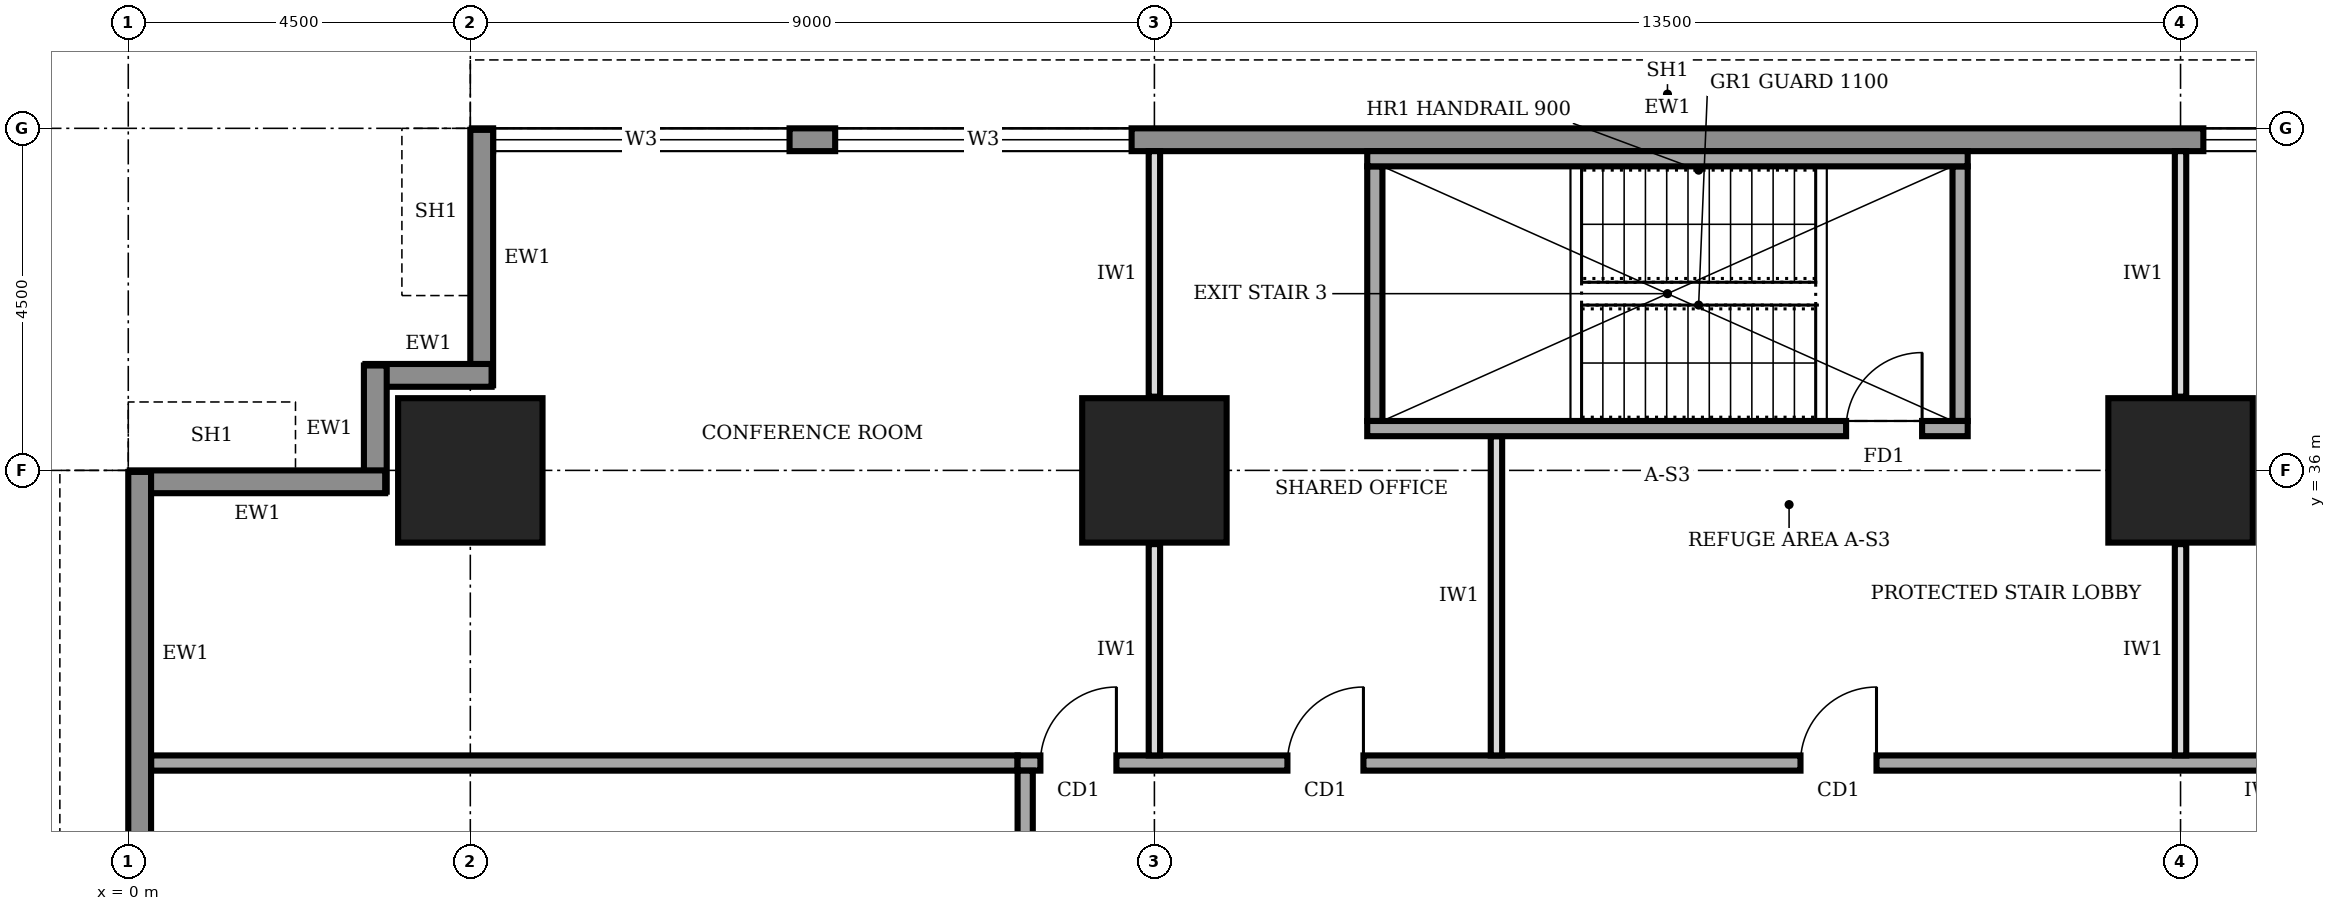
"""IFC4 building model, lengths in metres.
Left out: names, types, materials, properties, quantities, classifications, styles, units other than length and angle.
Written with IfcOpenShell. Run it as: python <this file> out.ifc"""

import sys

from ifc_helpers import new_model, si_unit, direction, frame, frame_2d, origin, origin_2d, place, context, subcontext, project, spatial, rectangle, extrude, element, fill, save


model = new_model("IFC4")
c1 = context("Model", 3, precision=1e-05, world=origin(), true_north=direction((0.0, 1.0)))
c2 = subcontext(c1, "Body", "Model", "MODEL_VIEW")
j1 = project(units=[si_unit("LENGTHUNIT", "METRE"), si_unit("PLANEANGLEUNIT", "RADIAN")], contexts=[c1])
p1 = place(None, origin())
s1 = spatial("IfcSite", under=j1, at=p1, CompositionType="ELEMENT")
p2 = place(p1, origin())
s2 = spatial("IfcBuilding", under=s1, at=p2, CompositionType="ELEMENT")
p3 = place(p2, frame((0.0, 0.0, 97.0)))
s3 = spatial("IfcBuildingStorey", under=s2, at=p3, CompositionType="ELEMENT", Elevation=97.0)
for number, where, z_axis, x_axis in (
    (1, (4.5, 36.0, 0.0), (0.0, 0.0, 1.0), (1.0, 0.0, 0.0)),
    (2, (13.5, 36.0, 0.0), (0.0, 0.0, 1.0), (1.0, 0.0, 0.0)),
    (3, (27.0, 36.0, 0.0), (0.0, 0.0, 1.0), (1.0, 0.0, 0.0)),
):
    element("IfcColumn", number, at=place(p3, frame(where, z_axis=z_axis, x_axis=x_axis)), inside=s3, PredefinedType="COLUMN", context=c2, shape_type="SweptSolid", body=[
        extrude(rectangle(XDim=1.9, YDim=1.9, at=origin_2d()), origin(), (0.0, 0.0, 1.0), 4.0),
    ])
p4 = place(p3, frame((35.98, 40.35, 0.0), z_axis=(0.0, 0.0, 1.0), x_axis=(-1.0, 0.0, 0.0)))
e4 = element("IfcWall", 4, at=p4, inside=s3, PredefinedType="STANDARD", context=c2, shape_type="SweptSolid", body=[
    extrude(rectangle(XDim=31.46, YDim=0.3, at=frame_2d((15.73, 0.0))), origin(), (0.0, 0.0, 1.0), 3.75),
])
p5 = place(p4, frame((27.28, 0.0, 0.95)))
e5 = element("IfcOpeningElement", 5, at=p5, cuts=e4, PredefinedType="OPENING", context=c2, shape_type="SweptSolid", body=[
    extrude(rectangle(XDim=3.9, YDim=1.8, at=frame_2d((1.95, 0.9))), frame((0.0, 0.16, 0.0), z_axis=(0.0, -1.0, 0.0), x_axis=(1.0, 0.0, 0.0)), (0.0, 0.0, 1.0), 0.32),
])
p6 = place(p4, frame((22.78, 0.0, 0.95)))
e6 = element("IfcOpeningElement", 6, at=p6, cuts=e4, PredefinedType="OPENING", context=c2, shape_type="SweptSolid", body=[
    extrude(rectangle(XDim=3.9, YDim=1.8, at=frame_2d((1.95, 0.9))), frame((0.0, 0.16, 0.0), z_axis=(0.0, -1.0, 0.0), x_axis=(1.0, 0.0, 0.0)), (0.0, 0.0, 1.0), 0.32),
])
p7 = place(p4, frame((4.78, 0.0, 0.95)))
e7 = element("IfcOpeningElement", 7, at=p7, cuts=e4, PredefinedType="OPENING", context=c2, shape_type="SweptSolid", body=[
    extrude(rectangle(XDim=3.9, YDim=1.8, at=frame_2d((1.95, 0.9))), frame((0.0, 0.16, 0.0), z_axis=(0.0, -1.0, 0.0), x_axis=(1.0, 0.0, 0.0)), (0.0, 0.0, 1.0), 0.32),
])
p8 = place(p3, frame((4.65, 40.48, 0.0), z_axis=(0.0, 0.0, 1.0), x_axis=(0.0, -1.0, 0.0)))
e8 = element("IfcWall", 8, at=p8, inside=s3, PredefinedType="STANDARD", context=c2, shape_type="SweptSolid", body=[
    extrude(rectangle(XDim=3.36, YDim=0.3, at=frame_2d((1.68, 0.0))), origin(), (0.0, 0.0, 1.0), 2.85),
])
for number, where, z_axis, x_axis in (
    (9, (4.78, 37.25, 0.0), (0.0, 0.0, 1.0), (-1.0, 0.0, 0.0)),
    (10, (3.25, 37.38, 0.0), (0.0, 0.0, 1.0), (0.0, -1.0, 0.0)),
):
    element("IfcWall", number, at=place(p3, frame(where, z_axis=z_axis, x_axis=x_axis)), inside=s3, PredefinedType="STANDARD", context=c2, shape_type="SweptSolid", body=[
        extrude(rectangle(XDim=1.66, YDim=0.3, at=frame_2d((0.83, 0.0))), origin(), (0.0, 0.0, 1.0), 3.75),
    ])
p9 = place(p3, frame((3.38, 35.85, 0.0), z_axis=(0.0, 0.0, 1.0), x_axis=(-1.0, 0.0, 0.0)))
e11 = element("IfcWall", 11, at=p9, inside=s3, PredefinedType="STANDARD", context=c2, shape_type="SweptSolid", body=[
    extrude(rectangle(XDim=3.36, YDim=0.3, at=frame_2d((1.68, 0.0))), origin(), (0.0, 0.0, 1.0), 2.85),
])
p10 = place(p3, frame((0.15, 35.98, 0.0), z_axis=(0.0, 0.0, 1.0), x_axis=(0.0, -1.0, 0.0)))
e12 = element("IfcWall", 12, at=p10, inside=s3, PredefinedType="STANDARD", context=c2, shape_type="SweptSolid", body=[
    extrude(rectangle(XDim=31.46, YDim=0.3, at=frame_2d((15.73, 0.0))), origin(), (0.0, 0.0, 1.0), 3.75),
])
p11 = place(p10, frame((27.28, 0.0, 0.95)))
e13 = element("IfcOpeningElement", 13, at=p11, cuts=e12, PredefinedType="OPENING", context=c2, shape_type="SweptSolid", body=[
    extrude(rectangle(XDim=3.9, YDim=1.8, at=frame_2d((1.95, 0.9))), frame((0.0, 0.16, 0.0), z_axis=(0.0, -1.0, 0.0), x_axis=(1.0, 0.0, 0.0)), (0.0, 0.0, 1.0), 0.32),
])
p12 = place(p10, frame((22.78, 0.0, 0.95)))
e14 = element("IfcOpeningElement", 14, at=p12, cuts=e12, PredefinedType="OPENING", context=c2, shape_type="SweptSolid", body=[
    extrude(rectangle(XDim=3.9, YDim=1.8, at=frame_2d((1.95, 0.9))), frame((0.0, 0.16, 0.0), z_axis=(0.0, -1.0, 0.0), x_axis=(1.0, 0.0, 0.0)), (0.0, 0.0, 1.0), 0.32),
])
p13 = place(p10, frame((18.28, 0.0, 0.95)))
e15 = element("IfcOpeningElement", 15, at=p13, cuts=e12, PredefinedType="OPENING", context=c2, shape_type="SweptSolid", body=[
    extrude(rectangle(XDim=3.9, YDim=1.8, at=frame_2d((1.95, 0.9))), frame((0.0, 0.16, 0.0), z_axis=(0.0, -1.0, 0.0), x_axis=(1.0, 0.0, 0.0)), (0.0, 0.0, 1.0), 0.32),
])
p14 = place(p10, frame((13.78, 0.0, 0.95)))
e16 = element("IfcOpeningElement", 16, at=p14, cuts=e12, PredefinedType="OPENING", context=c2, shape_type="SweptSolid", body=[
    extrude(rectangle(XDim=3.9, YDim=1.8, at=frame_2d((1.95, 0.9))), frame((0.0, 0.16, 0.0), z_axis=(0.0, -1.0, 0.0), x_axis=(1.0, 0.0, 0.0)), (0.0, 0.0, 1.0), 0.32),
])
p15 = place(p10, frame((9.28, 0.0, 0.95)))
e17 = element("IfcOpeningElement", 17, at=p15, cuts=e12, PredefinedType="OPENING", context=c2, shape_type="SweptSolid", body=[
    extrude(rectangle(XDim=3.9, YDim=1.8, at=frame_2d((1.95, 0.9))), frame((0.0, 0.16, 0.0), z_axis=(0.0, -1.0, 0.0), x_axis=(1.0, 0.0, 0.0)), (0.0, 0.0, 1.0), 0.32),
])
p16 = place(p10, frame((4.78, 0.0, 0.95)))
e18 = element("IfcOpeningElement", 18, at=p16, cuts=e12, PredefinedType="OPENING", context=c2, shape_type="SweptSolid", body=[
    extrude(rectangle(XDim=3.9, YDim=1.8, at=frame_2d((1.95, 0.9))), frame((0.0, 0.16, 0.0), z_axis=(0.0, -1.0, 0.0), x_axis=(1.0, 0.0, 0.0)), (0.0, 0.0, 1.0), 0.32),
])
p17 = place(p3, frame((40.2, 32.15, 0.0), z_axis=(0.0, 0.0, 1.0), x_axis=(-1.0, 0.0, 0.0)))
e19 = element("IfcWall", 19, at=p17, inside=s3, PredefinedType="SOLIDWALL", context=c2, shape_type="SweptSolid", body=[
    extrude(rectangle(XDim=28.5, YDim=0.2, at=frame_2d((14.25, 0.0))), origin(), (0.0, 0.0, 1.0), 3.75),
])
p18 = place(p17, frame((27.2, 0.0, 0.0)))
e20 = element("IfcOpeningElement", 20, at=p18, cuts=e19, PredefinedType="OPENING", context=c2, shape_type="SweptSolid", body=[
    extrude(rectangle(XDim=1.0, YDim=2.1, at=frame_2d((0.5, 1.05))), frame((0.0, 0.11, 0.0), z_axis=(0.0, -1.0, 0.0), x_axis=(1.0, 0.0, 0.0)), (0.0, 0.0, 1.0), 0.22),
])
p19 = place(p17, frame((23.95, 0.0, 0.0)))
e21 = element("IfcOpeningElement", 21, at=p19, cuts=e19, PredefinedType="OPENING", context=c2, shape_type="SweptSolid", body=[
    extrude(rectangle(XDim=1.0, YDim=2.1, at=frame_2d((0.5, 1.05))), frame((0.0, 0.11, 0.0), z_axis=(0.0, -1.0, 0.0), x_axis=(1.0, 0.0, 0.0)), (0.0, 0.0, 1.0), 0.22),
])
p20 = place(p17, frame((17.2, 0.0, 0.0)))
e22 = element("IfcOpeningElement", 22, at=p20, cuts=e19, PredefinedType="OPENING", context=c2, shape_type="SweptSolid", body=[
    extrude(rectangle(XDim=1.0, YDim=2.1, at=frame_2d((0.5, 1.05))), frame((0.0, 0.11, 0.0), z_axis=(0.0, -1.0, 0.0), x_axis=(1.0, 0.0, 0.0)), (0.0, 0.0, 1.0), 0.22),
])
p21 = place(p17, frame((6.0, 0.0, 0.0)))
e23 = element("IfcOpeningElement", 23, at=p21, cuts=e19, PredefinedType="OPENING", context=c2, shape_type="SweptSolid", body=[
    extrude(rectangle(XDim=1.0, YDim=2.1, at=frame_2d((0.5, 1.05))), frame((0.0, 0.11, 0.0), z_axis=(0.0, -1.0, 0.0), x_axis=(1.0, 0.0, 0.0)), (0.0, 0.0, 1.0), 0.22),
])
p22 = place(p3, frame((11.8, 32.05, 0.0), z_axis=(0.0, 0.0, 1.0), x_axis=(0.0, -1.0, 0.0)))
e24 = element("IfcWall", 24, at=p22, inside=s3, PredefinedType="SOLIDWALL", context=c2, shape_type="SweptSolid", body=[
    extrude(rectangle(XDim=23.8, YDim=0.2, at=frame_2d((11.9, 0.0))), origin(), (0.0, 0.0, 1.0), 3.75),
])
p23 = place(p22, frame((20.675, 0.0, 0.0)))
e25 = element("IfcOpeningElement", 25, at=p23, cuts=e24, PredefinedType="OPENING", context=c2, shape_type="SweptSolid", body=[
    extrude(rectangle(XDim=1.0, YDim=2.1, at=frame_2d((0.5, 1.05))), frame((0.0, 0.11, 0.0), z_axis=(0.0, -1.0, 0.0), x_axis=(1.0, 0.0, 0.0)), (0.0, 0.0, 1.0), 0.22),
])
p24 = place(p22, frame((16.95, 0.0, 0.0)))
e26 = element("IfcOpeningElement", 26, at=p24, cuts=e24, PredefinedType="OPENING", context=c2, shape_type="SweptSolid", body=[
    extrude(rectangle(XDim=1.0, YDim=2.1, at=frame_2d((0.5, 1.05))), frame((0.0, 0.11, 0.0), z_axis=(0.0, -1.0, 0.0), x_axis=(1.0, 0.0, 0.0)), (0.0, 0.0, 1.0), 0.22),
])
p25 = place(p22, frame((13.95, 0.0, 0.0)))
e27 = element("IfcOpeningElement", 27, at=p25, cuts=e24, PredefinedType="OPENING", context=c2, shape_type="SweptSolid", body=[
    extrude(rectangle(XDim=0.9, YDim=2.1, at=frame_2d((0.45, 1.05))), frame((0.0, 0.11, 0.0), z_axis=(0.0, -1.0, 0.0), x_axis=(1.0, 0.0, 0.0)), (0.0, 0.0, 1.0), 0.22),
])
p26 = place(p22, frame((10.9, 0.0, 0.0)))
e28 = element("IfcOpeningElement", 28, at=p26, cuts=e24, PredefinedType="OPENING", context=c2, shape_type="SweptSolid", body=[
    extrude(rectangle(XDim=0.9, YDim=2.1, at=frame_2d((0.45, 1.05))), frame((0.0, 0.11, 0.0), z_axis=(0.0, -1.0, 0.0), x_axis=(1.0, 0.0, 0.0)), (0.0, 0.0, 1.0), 0.22),
])
p27 = place(p22, frame((6.2, 0.0, 0.0)))
e29 = element("IfcOpeningElement", 29, at=p27, cuts=e24, PredefinedType="OPENING", context=c2, shape_type="SweptSolid", body=[
    extrude(rectangle(XDim=0.9, YDim=2.1, at=frame_2d((0.45, 1.05))), frame((0.0, 0.11, 0.0), z_axis=(0.0, -1.0, 0.0), x_axis=(1.0, 0.0, 0.0)), (0.0, 0.0, 1.0), 0.22),
])
p28 = place(p22, frame((8.75, 0.0, 0.0)))
e30 = element("IfcOpeningElement", 30, at=p28, cuts=e24, PredefinedType="OPENING", context=c2, shape_type="SweptSolid", body=[
    extrude(rectangle(XDim=1.0, YDim=2.1, at=frame_2d((0.5, 1.05))), frame((0.0, 0.11, 0.0), z_axis=(0.0, -1.0, 0.0), x_axis=(1.0, 0.0, 0.0)), (0.0, 0.0, 1.0), 0.22),
])
p29 = place(p22, frame((1.925, 0.0, 0.0)))
e31 = element("IfcOpeningElement", 31, at=p29, cuts=e24, PredefinedType="OPENING", context=c2, shape_type="SweptSolid", body=[
    extrude(rectangle(XDim=1.0, YDim=2.1, at=frame_2d((0.5, 1.05))), frame((0.0, 0.11, 0.0), z_axis=(0.0, -1.0, 0.0), x_axis=(1.0, 0.0, 0.0)), (0.0, 0.0, 1.0), 0.22),
])
p30 = place(p3, frame((0.3, 32.15, 0.0), z_axis=(0.0, 0.0, 1.0), x_axis=(1.0, 0.0, 0.0)))
e32 = element("IfcWall", 32, at=p30, inside=s3, PredefinedType="SOLIDWALL", context=c2, shape_type="SweptSolid", body=[
    extrude(rectangle(XDim=11.4, YDim=0.2, at=frame_2d((5.7, 0.0))), origin(), (0.0, 0.0, 1.0), 3.75),
])
p31 = place(p3, frame((13.5, 32.25, 0.0), z_axis=(0.0, 0.0, 1.0), x_axis=(0.0, 1.0, 0.0)))
e33 = element("IfcWall", 33, at=p31, inside=s3, PredefinedType="PARTITIONING", context=c2, shape_type="SweptSolid", body=[
    extrude(rectangle(XDim=2.78, YDim=0.15, at=frame_2d((1.39, 0.0))), origin(), (0.0, 0.0, 1.0), 2.85),
])
p32 = place(p3, frame((13.5, 36.97, 0.0), z_axis=(0.0, 0.0, 1.0), x_axis=(0.0, 1.0, 0.0)))
e34 = element("IfcWall", 34, at=p32, inside=s3, PredefinedType="PARTITIONING", context=c2, shape_type="SweptSolid", body=[
    extrude(rectangle(XDim=3.23, YDim=0.15, at=frame_2d((1.615, 0.0))), origin(), (0.0, 0.0, 1.0), 2.85),
])
p33 = place(p3, frame((18.0, 32.25, 0.0), z_axis=(0.0, 0.0, 1.0), x_axis=(0.0, 1.0, 0.0)))
e35 = element("IfcWall", 35, at=p33, inside=s3, PredefinedType="PARTITIONING", context=c2, shape_type="SweptSolid", body=[
    extrude(rectangle(XDim=4.2, YDim=0.15, at=frame_2d((2.1, 0.0))), origin(), (0.0, 0.0, 1.0), 3.75),
])
p34 = place(p3, frame((27.0, 32.25, 0.0), z_axis=(0.0, 0.0, 1.0), x_axis=(0.0, 1.0, 0.0)))
e36 = element("IfcWall", 36, at=p34, inside=s3, PredefinedType="PARTITIONING", context=c2, shape_type="SweptSolid", body=[
    extrude(rectangle(XDim=2.78, YDim=0.15, at=frame_2d((1.39, 0.0))), origin(), (0.0, 0.0, 1.0), 2.85),
])
p35 = place(p3, frame((27.0, 36.97, 0.0), z_axis=(0.0, 0.0, 1.0), x_axis=(0.0, 1.0, 0.0)))
e37 = element("IfcWall", 37, at=p35, inside=s3, PredefinedType="PARTITIONING", context=c2, shape_type="SweptSolid", body=[
    extrude(rectangle(XDim=3.23, YDim=0.15, at=frame_2d((1.615, 0.0))), origin(), (0.0, 0.0, 1.0), 2.85),
])
p36 = place(p3, frame((16.3, 36.55, 0.0), z_axis=(0.0, 0.0, 1.0), x_axis=(1.0, 0.0, 0.0)))
e38 = element("IfcWall", 38, at=p36, inside=s3, PredefinedType="SOLIDWALL", context=c2, shape_type="SweptSolid", body=[
    extrude(rectangle(XDim=7.9, YDim=0.2, at=frame_2d((3.95, 0.0))), origin(), (0.0, 0.0, 1.0), 3.75),
])
p37 = place(p36, frame((6.3, 0.0, 0.0)))
e39 = element("IfcOpeningElement", 39, at=p37, cuts=e38, PredefinedType="OPENING", context=c2, shape_type="SweptSolid", body=[
    extrude(rectangle(XDim=1.0, YDim=2.1, at=frame_2d((0.5, 1.05))), frame((0.0, 0.11, 0.0), z_axis=(0.0, -1.0, 0.0), x_axis=(1.0, 0.0, 0.0)), (0.0, 0.0, 1.0), 0.22),
])
p38 = place(p3, frame((16.3, 40.1, 0.0), z_axis=(0.0, 0.0, 1.0), x_axis=(1.0, 0.0, 0.0)))
e40 = element("IfcWall", 40, at=p38, inside=s3, PredefinedType="SOLIDWALL", context=c2, shape_type="SweptSolid", body=[
    extrude(rectangle(XDim=7.9, YDim=0.2, at=frame_2d((3.95, 0.0))), origin(), (0.0, 0.0, 1.0), 3.75),
])
for number, where, z_axis, x_axis in (
    (41, (16.4, 36.65, 0.0), (0.0, 0.0, 1.0), (0.0, 1.0, 0.0)),
    (42, (24.1, 36.65, 0.0), (0.0, 0.0, 1.0), (0.0, 1.0, 0.0)),
):
    element("IfcWall", number, at=place(p3, frame(where, z_axis=z_axis, x_axis=x_axis)), inside=s3, PredefinedType="SOLIDWALL", context=c2, shape_type="SweptSolid", body=[
        extrude(rectangle(XDim=3.35, YDim=0.2, at=frame_2d((1.675, 0.0))), origin(), (0.0, 0.0, 1.0), 3.75),
    ])
p39 = place(p5, origin())
e43 = element("IfcWindow", 43, at=p39, inside=s3, PartitioningType="SINGLE_PANEL", PredefinedType="WINDOW", context=c2, shape_type="SweptSolid", body=[
    extrude(rectangle(XDim=3.9, YDim=1.8, at=frame_2d((1.95, 0.9))), frame((0.0, 0.03, 0.0), z_axis=(0.0, -1.0, 0.0), x_axis=(1.0, 0.0, 0.0)), (0.0, 0.0, 1.0), 0.06),
])
fill(e5, e43)
p40 = place(p6, origin())
e44 = element("IfcWindow", 44, at=p40, inside=s3, PartitioningType="SINGLE_PANEL", PredefinedType="WINDOW", context=c2, shape_type="SweptSolid", body=[
    extrude(rectangle(XDim=3.9, YDim=1.8, at=frame_2d((1.95, 0.9))), frame((0.0, 0.03, 0.0), z_axis=(0.0, -1.0, 0.0), x_axis=(1.0, 0.0, 0.0)), (0.0, 0.0, 1.0), 0.06),
])
fill(e6, e44)
p41 = place(p7, origin())
e45 = element("IfcWindow", 45, at=p41, inside=s3, PartitioningType="SINGLE_PANEL", PredefinedType="WINDOW", context=c2, shape_type="SweptSolid", body=[
    extrude(rectangle(XDim=3.9, YDim=1.8, at=frame_2d((1.95, 0.9))), frame((0.0, 0.03, 0.0), z_axis=(0.0, -1.0, 0.0), x_axis=(1.0, 0.0, 0.0)), (0.0, 0.0, 1.0), 0.06),
])
fill(e7, e45)
p42 = place(p18, frame((1.0, 0.0, 0.0), z_axis=(0.0, 0.0, 1.0), x_axis=(-1.0, 0.0, 0.0)))
e46 = element("IfcDoor", 46, at=p42, inside=s3, OperationType="SINGLE_SWING_RIGHT", PredefinedType="DOOR", context=c2, shape_type="SweptSolid", body=[
    extrude(rectangle(XDim=1.0, YDim=2.1, at=frame_2d((0.5, 1.05))), frame((0.0, 0.025, 0.0), z_axis=(0.0, -1.0, 0.0), x_axis=(1.0, 0.0, 0.0)), (0.0, 0.0, 1.0), 0.05),
])
fill(e20, e46)
p43 = place(p19, frame((1.0, 0.0, 0.0), z_axis=(0.0, 0.0, 1.0), x_axis=(-1.0, 0.0, 0.0)))
e47 = element("IfcDoor", 47, at=p43, inside=s3, OperationType="SINGLE_SWING_RIGHT", PredefinedType="DOOR", context=c2, shape_type="SweptSolid", body=[
    extrude(rectangle(XDim=1.0, YDim=2.1, at=frame_2d((0.5, 1.05))), frame((0.0, 0.025, 0.0), z_axis=(0.0, -1.0, 0.0), x_axis=(1.0, 0.0, 0.0)), (0.0, 0.0, 1.0), 0.05),
])
fill(e21, e47)
p44 = place(p20, frame((1.0, 0.0, 0.0), z_axis=(0.0, 0.0, 1.0), x_axis=(-1.0, 0.0, 0.0)))
e48 = element("IfcDoor", 48, at=p44, inside=s3, OperationType="SINGLE_SWING_RIGHT", PredefinedType="DOOR", context=c2, shape_type="SweptSolid", body=[
    extrude(rectangle(XDim=1.0, YDim=2.1, at=frame_2d((0.5, 1.05))), frame((0.0, 0.025, 0.0), z_axis=(0.0, -1.0, 0.0), x_axis=(1.0, 0.0, 0.0)), (0.0, 0.0, 1.0), 0.05),
])
fill(e22, e48)
p45 = place(p37, origin())
e49 = element("IfcDoor", 49, at=p45, inside=s3, OperationType="SINGLE_SWING_RIGHT", PredefinedType="DOOR", context=c2, shape_type="SweptSolid", body=[
    extrude(rectangle(XDim=1.0, YDim=2.1, at=frame_2d((0.5, 1.05))), frame((0.0, 0.025, 0.0), z_axis=(0.0, -1.0, 0.0), x_axis=(1.0, 0.0, 0.0)), (0.0, 0.0, 1.0), 0.05),
])
fill(e39, e49)
save(model, sys.argv[1])
